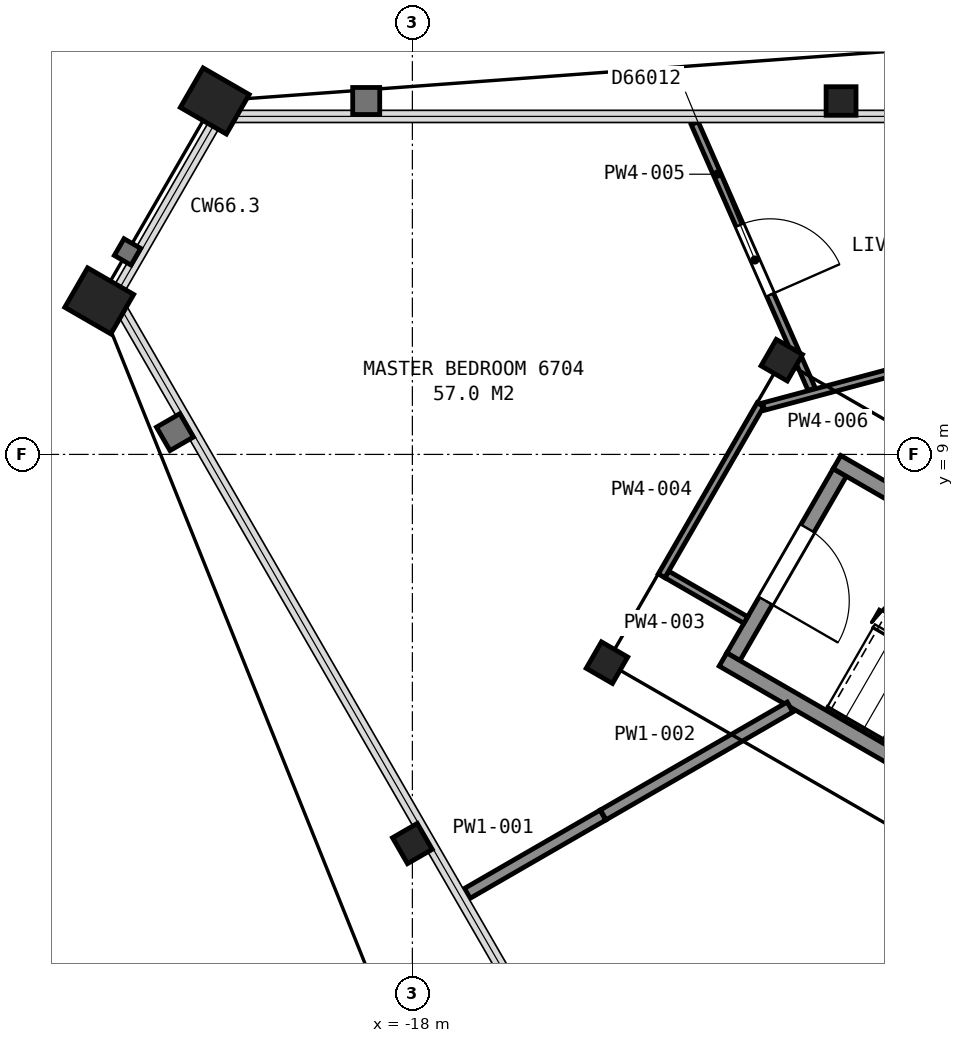
"""IFC4 building model, lengths in metres.
Left out: names, types, materials, properties, quantities, classifications, styles, units other than length and angle.
Written with IfcOpenShell. Run it as: python <this file> out.ifc"""

import sys

from ifc_helpers import new_model, si_unit, direction, frame, frame_2d, origin, origin_2d, place, context, subcontext, project, spatial, rectangle, hollow_rectangle, i_section, extrude, element, fill, save


model = new_model("IFC4")
c1 = context("Model", 3, precision=1e-05, world=origin(), true_north=direction((0.0, 1.0)))
c2 = subcontext(c1, "Body", "Model", "MODEL_VIEW")
j1 = project(units=[si_unit("LENGTHUNIT", "METRE"), si_unit("PLANEANGLEUNIT", "RADIAN")], contexts=[c1])
p1 = place(None, origin())
s1 = spatial("IfcSite", under=j1, at=p1, CompositionType="ELEMENT")
p2 = place(p1, origin())
s2 = spatial("IfcBuilding", under=s1, at=p2, CompositionType="ELEMENT")
p3 = place(p2, frame((0.0, 0.0, 267.7)))
s3 = spatial("IfcBuildingStorey", under=s2, at=p3, CompositionType="ELEMENT", Elevation=267.7)
p4 = place(p3, frame((-12.36, 13.65, 0.0), z_axis=(0.0, 0.0, 1.0), x_axis=(1.0, 0.0, 0.0)))
e1 = element("IfcColumn", 1, at=p4, inside=s3, PredefinedType="COLUMN", context=c2, shape_type="SweptSolid", body=[
    extrude(i_section(OverallWidth=0.394, OverallDepth=0.376, WebThickness=0.017, FlangeThickness=0.028, FilletRadius=0.015, at=origin_2d()), origin(), (0.0, 0.0, 1.0), 3.7),
])
for number, where, z_axis, x_axis in (
    (2, (-20.6, 13.65, 0.0), (0.0, 0.0, 1.0), (0.5, 0.866, 0.0)),
    (3, (-22.12, 11.02, 0.0), (0.0, 0.0, 1.0), (0.5, 0.866, 0.0)),
):
    element("IfcColumn", number, at=place(p3, frame(where, z_axis=z_axis, x_axis=x_axis)), inside=s3, PredefinedType="COLUMN", context=c2, shape_type="SweptSolid", body=[
        extrude(hollow_rectangle(XDim=0.6, YDim=0.7, WallThickness=0.04, at=origin_2d()), origin(), (0.0, 0.0, 1.0), 3.7),
    ])
p5 = place(p3, frame((-18.0, 3.88, 0.0), z_axis=(0.0, 0.0, 1.0), x_axis=(-0.5, 0.866025403784, 0.0)))
e4 = element("IfcColumn", 4, at=p5, inside=s3, PredefinedType="COLUMN", context=c2, shape_type="SweptSolid", body=[
    extrude(i_section(OverallWidth=0.394, OverallDepth=0.376, WebThickness=0.017, FlangeThickness=0.028, FilletRadius=0.015, at=origin_2d()), origin(), (0.0, 0.0, 1.0), 3.7),
])
for number, where, z_axis, x_axis in (
    (5, (-13.14, 10.24, 0.0), (0.0, 0.0, 1.0), (0.5, 0.866, 0.0)),
    (6, (-15.44, 6.26, 0.0), (0.0, 0.0, 1.0), (0.5, 0.866, 0.0)),
):
    element("IfcColumn", number, at=place(p3, frame(where, z_axis=z_axis, x_axis=x_axis)), inside=s3, PredefinedType="COLUMN", context=c2, shape_type="SweptSolid", body=[
        extrude(i_section(OverallWidth=0.401, OverallDepth=0.399, WebThickness=0.025, FlangeThickness=0.04, FilletRadius=0.015, at=origin_2d()), origin(), (0.0, 0.0, 1.0), 3.7),
    ])
p6 = place(p3, frame((-12.377, 8.762, 0.0), z_axis=(0.0, 0.0, 1.0), x_axis=(-0.500049511043, -0.865996816683, 0.0)))
e7 = element("IfcWall", 7, at=p6, inside=s3, PredefinedType="PARTITIONING", context=c2, shape_type="SweptSolid", body=[
    extrude(rectangle(XDim=2.8, YDim=0.2, at=frame_2d((1.4, 0.0))), origin(), (0.0, 0.0, 1.0), 3.45),
])
p7 = place(p6, frame((0.85, 0.0, 0.0)))
e8 = element("IfcOpeningElement", 8, at=p7, cuts=e7, PredefinedType="OPENING", context=c2, shape_type="SweptSolid", body=[
    extrude(rectangle(XDim=1.1, YDim=2.1, at=frame_2d((0.55, 1.05))), frame((0.0, 0.11, 0.0), z_axis=(0.0, -1.0, 0.0), x_axis=(1.0, 0.0, 0.0)), (0.0, 0.0, 1.0), 0.22),
])
for number, where, z_axis, x_axis in (
    (9, (-7.678, 2.701, 0.0), (0.0, 0.0, 1.0), (-0.866, 0.5, 0.0)),
    (10, (-6.178, 5.299, 0.0), (0.0, 0.0, 1.0), (-0.866, 0.5, 0.0)),
):
    element("IfcWall", number, at=place(p3, frame(where, z_axis=z_axis, x_axis=x_axis)), inside=s3, PredefinedType="PARTITIONING", context=c2, shape_type="SweptSolid", body=[
        extrude(rectangle(XDim=7.2, YDim=0.2, at=frame_2d((3.6, 0.0))), origin(), (0.0, 0.0, 1.0), 3.45),
    ])
p8 = place(p3, frame((-17.278, 3.224, 0.0), z_axis=(0.0, 0.0, 1.0), x_axis=(0.8661500768, 0.499783997803, 0.0)))
e11 = element("IfcWall", 11, at=p8, inside=s3, PredefinedType="PARTITIONING", context=c2, shape_type="SweptSolid", body=[
    extrude(rectangle(XDim=2.061, YDim=0.15, at=frame_2d((1.03, 0.0))), origin(), (0.0, 0.0, 1.0), 2.723),
])
p9 = place(p3, frame((-15.489, 4.257, 0.0), z_axis=(0.0, 0.0, 1.0), x_axis=(0.866053804324, 0.499950805595, 0.0)))
e12 = element("IfcWall", 12, at=p9, inside=s3, PredefinedType="PARTITIONING", context=c2, shape_type="SweptSolid", body=[
    extrude(rectangle(XDim=2.838, YDim=0.15, at=frame_2d((1.419, 0.0))), origin(), (0.0, 0.0, 1.0), 2.723),
])
p10 = place(p3, frame((-14.653, 7.421, 0.0), z_axis=(0.0, 0.0, 1.0), x_axis=(0.865941482684, -0.500145327446, 0.0)))
e13 = element("IfcWall", 13, at=p10, inside=s3, PredefinedType="PARTITIONING", context=c2, shape_type="SweptSolid", body=[
    extrude(rectangle(XDim=1.199, YDim=0.1, at=frame_2d((0.6, 0.0))), origin(), (0.0, 0.0, 1.0), 2.723),
])
p11 = place(p3, frame((-14.721, 7.403, 0.0), z_axis=(0.0, 0.0, 1.0), x_axis=(0.500006934395, 0.866021400173, 0.0)))
e14 = element("IfcWall", 14, at=p11, inside=s3, PredefinedType="PARTITIONING", context=c2, shape_type="SweptSolid", body=[
    extrude(rectangle(XDim=2.6, YDim=0.1, at=frame_2d((1.3, 0.0))), origin(), (0.0, 0.0, 1.0), 2.723),
])
p12 = place(p3, frame((-12.747, 9.857, 0.0), z_axis=(0.0, 0.0, 1.0), x_axis=(-0.402509649346, 0.91541574281, 0.0)))
e15 = element("IfcWall", 15, at=p12, inside=s3, PredefinedType="PARTITIONING", context=c2, shape_type="SweptSolid", body=[
    extrude(rectangle(XDim=3.824, YDim=0.1, at=frame_2d((1.912, 0.0))), origin(), (0.0, 0.0, 1.0), 2.723),
])
p13 = place(p12, frame((1.357, 0.0, 0.0)))
e16 = element("IfcOpeningElement", 16, at=p13, cuts=e15, PredefinedType="OPENING", context=c2, shape_type="SweptSolid", body=[
    extrude(rectangle(XDim=1.0, YDim=2.1, at=frame_2d((0.5, 1.05))), frame((0.0, 0.06, 0.0), z_axis=(0.0, -1.0, 0.0), x_axis=(1.0, 0.0, 0.0)), (0.0, 0.0, 1.0), 0.12),
])
p14 = place(p3, frame((-13.378, 9.629, 0.0), z_axis=(0.0, 0.0, 1.0), x_axis=(0.966007272337, 0.258514892785, 0.0)))
e17 = element("IfcWall", 17, at=p14, inside=s3, PredefinedType="PARTITIONING", context=c2, shape_type="SweptSolid", body=[
    extrude(rectangle(XDim=1.747, YDim=0.1, at=frame_2d((0.874, 0.0))), origin(), (0.0, 0.0, 1.0), 2.723),
])
p15 = place(p7, origin())
e18 = element("IfcDoor", 18, at=p15, inside=s3, OperationType="SINGLE_SWING_RIGHT", PredefinedType="DOOR", context=c2, shape_type="SweptSolid", body=[
    extrude(rectangle(XDim=1.1, YDim=2.1, at=frame_2d((0.55, 1.05))), frame((0.0, 0.025, 0.0), z_axis=(0.0, -1.0, 0.0), x_axis=(1.0, 0.0, 0.0)), (0.0, 0.0, 1.0), 0.05),
])
fill(e8, e18)
p16 = place(p13, origin())
e19 = element("IfcDoor", 19, at=p16, inside=s3, OperationType="SINGLE_SWING_LEFT", PredefinedType="DOOR", context=c2, shape_type="SweptSolid", body=[
    extrude(rectangle(XDim=1.0, YDim=2.1, at=frame_2d((0.5, 1.05))), frame((0.0, 0.025, 0.0), z_axis=(0.0, -1.0, 0.0), x_axis=(1.0, 0.0, 0.0)), (0.0, 0.0, 1.0), 0.05),
])
fill(e16, e19)
save(model, sys.argv[1])
